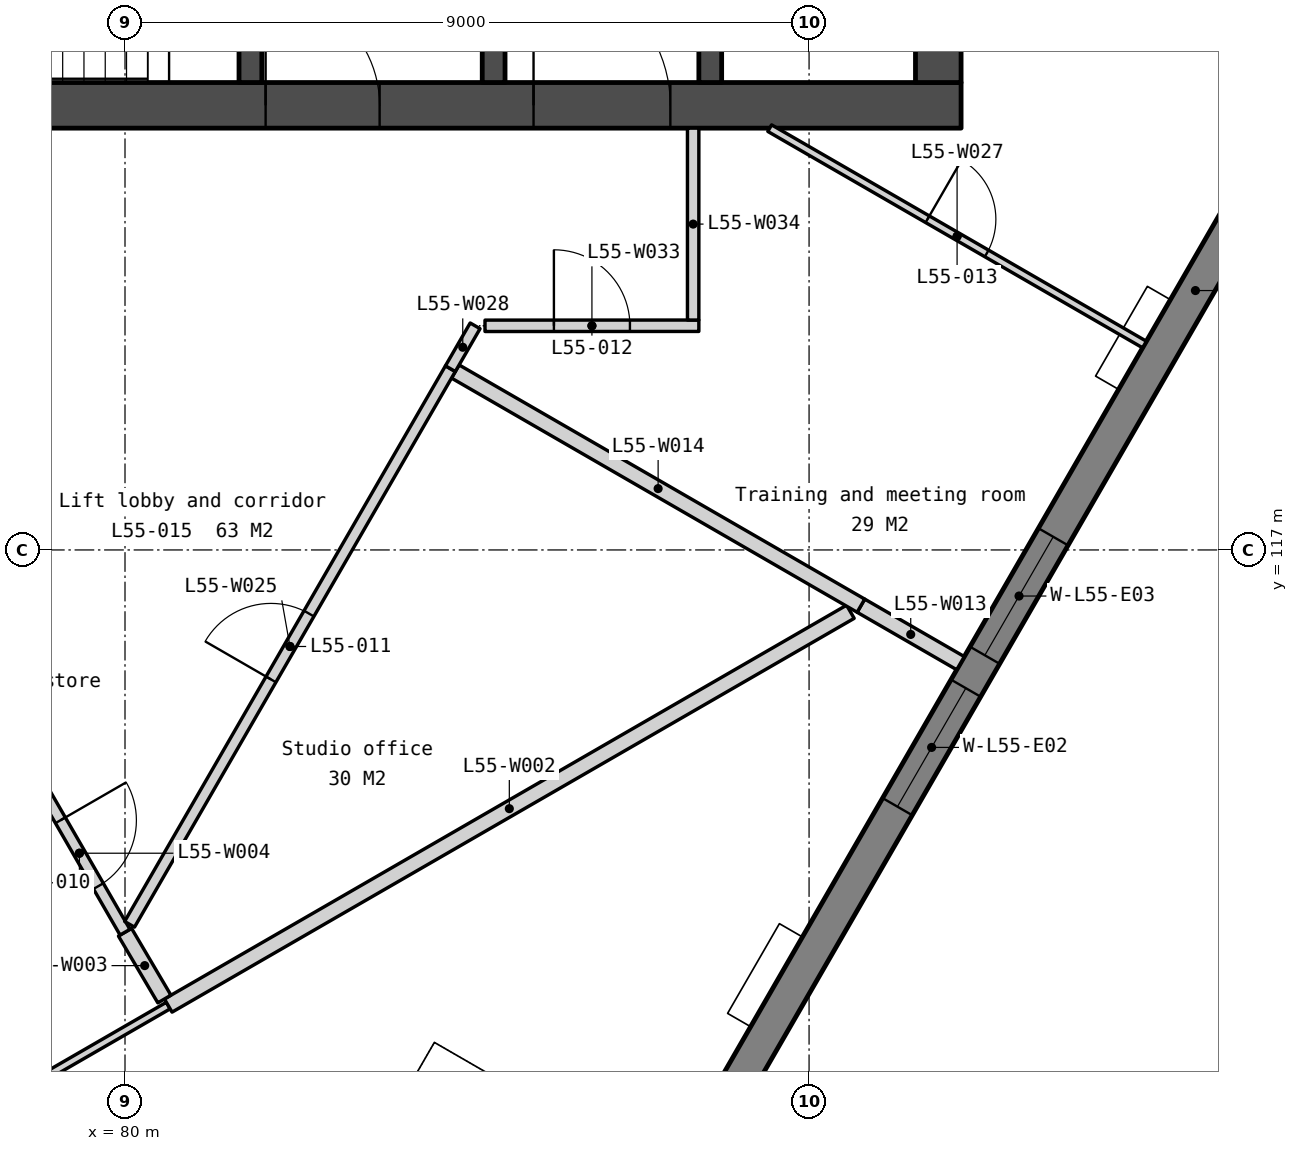
"""IFC4 building model, lengths in metres.
Left out: names, types, materials, properties, quantities, classifications, styles, units other than length and angle.
Written with IfcOpenShell. Run it as: python <this file> out.ifc"""

import sys

from ifc_helpers import new_model, si_unit, direction, frame, frame_2d, origin, place, context, subcontext, project, spatial, polyline, rectangle, outline, extrude, element, fill, save


model = new_model("IFC4")
c1 = context("Model", 3, precision=1e-05, world=origin(), true_north=direction((0.0, 1.0)))
c2 = subcontext(c1, "Body", "Model", "MODEL_VIEW")
j1 = project(units=[si_unit("LENGTHUNIT", "METRE"), si_unit("PLANEANGLEUNIT", "RADIAN")], contexts=[c1])
p1 = place(None, origin())
s1 = spatial("IfcSite", under=j1, at=p1, CompositionType="ELEMENT")
p2 = place(p1, origin())
s2 = spatial("IfcBuilding", under=s1, at=p2, CompositionType="ELEMENT")
p3 = place(p2, frame((0.0, 0.0, 219.2)))
s3 = spatial("IfcBuildingStorey", under=s2, at=p3, CompositionType="ELEMENT", Elevation=219.2)
p4 = place(p3, frame((69.0, 122.85, 0.0), z_axis=(0.0, 0.0, 1.0), x_axis=(1.0, 0.0, 0.0)))
e1 = element("IfcWall", 1, at=p4, inside=s3, PredefinedType="SOLIDWALL", context=c2, shape_type="SweptSolid", body=[
    extrude(rectangle(XDim=22.0, YDim=0.6, at=frame_2d((11.0, 0.0))), origin(), (0.0, 0.0, 1.0), 3.75),
])
p5 = place(p4, frame((16.375, 0.0, 0.0)))
e2 = element("IfcOpeningElement", 2, at=p5, cuts=e1, PredefinedType="OPENING", context=c2, shape_type="SweptSolid", body=[
    extrude(rectangle(XDim=1.8, YDim=2.1, at=frame_2d((0.9, 1.05))), frame((0.0, 0.31, 0.0), z_axis=(0.0, -1.0, 0.0), x_axis=(1.0, 0.0, 0.0)), (0.0, 0.0, 1.0), 0.62),
])
p6 = place(p4, frame((3.825, 0.0, 0.0)))
e3 = element("IfcOpeningElement", 3, at=p6, cuts=e1, PredefinedType="OPENING", context=c2, shape_type="SweptSolid", body=[
    extrude(rectangle(XDim=1.8, YDim=2.1, at=frame_2d((0.9, 1.05))), frame((0.0, 0.31, 0.0), z_axis=(0.0, -1.0, 0.0), x_axis=(1.0, 0.0, 0.0)), (0.0, 0.0, 1.0), 0.62),
])
p7 = place(p4, frame((12.85, 0.0, 0.0)))
e4 = element("IfcOpeningElement", 4, at=p7, cuts=e1, PredefinedType="OPENING", context=c2, shape_type="SweptSolid", body=[
    extrude(rectangle(XDim=1.5, YDim=2.1, at=frame_2d((0.75, 1.05))), frame((0.0, 0.31, 0.0), z_axis=(0.0, -1.0, 0.0), x_axis=(1.0, 0.0, 0.0)), (0.0, 0.0, 1.0), 0.62),
])
p8 = place(p3, frame((81.65, 125.7, 0.0), z_axis=(0.0, 0.0, 1.0), x_axis=(0.0, -1.0, 0.0)))
e5 = element("IfcWall", 5, at=p8, inside=s3, PredefinedType="SOLIDWALL", context=c2, shape_type="SweptSolid", body=[
    extrude(rectangle(XDim=2.55, YDim=0.3, at=frame_2d((1.275, 0.0))), origin(), (0.0, 0.0, 1.0), 3.75),
])
p9 = place(p8, frame((0.75, 0.0, 0.0)))
e6 = element("IfcOpeningElement", 6, at=p9, cuts=e5, PredefinedType="OPENING", context=c2, shape_type="SweptSolid", body=[
    extrude(rectangle(XDim=1.0, YDim=2.1, at=frame_2d((0.5, 1.05))), frame((0.0, 0.16, 0.0), z_axis=(0.0, -1.0, 0.0), x_axis=(1.0, 0.0, 0.0)), (0.0, 0.0, 1.0), 0.32),
])
p10 = place(p3, frame((84.85, 125.85, 0.0), z_axis=(0.0, 0.0, 1.0), x_axis=(0.0, -1.0, 0.0)))
e7 = element("IfcWall", 7, at=p10, inside=s3, PredefinedType="SOLIDWALL", context=c2, shape_type="SweptSolid", body=[
    extrude(rectangle(XDim=2.7, YDim=0.3, at=frame_2d((1.35, 0.0))), origin(), (0.0, 0.0, 1.0), 3.75),
])
p11 = place(p3, frame((87.7, 133.95, 0.0), z_axis=(0.0, 0.0, 1.0), x_axis=(0.0, -1.0, 0.0)))
e8 = element("IfcWall", 8, at=p11, inside=s3, PredefinedType="SOLIDWALL", context=c2, shape_type="SweptSolid", body=[
    extrude(rectangle(XDim=10.8, YDim=0.3, at=frame_2d((5.4, 0.0))), origin(), (0.0, 0.0, 1.0), 3.75),
])
p12 = place(p11, frame((6.95, 0.0, 0.0)))
e9 = element("IfcOpeningElement", 9, at=p12, cuts=e8, PredefinedType="OPENING", context=c2, shape_type="SweptSolid", body=[
    extrude(rectangle(XDim=1.1, YDim=2.1, at=frame_2d((0.55, 1.05))), frame((0.0, 0.16, 0.0), z_axis=(0.0, -1.0, 0.0), x_axis=(1.0, 0.0, 0.0)), (0.0, 0.0, 1.0), 0.32),
])
p13 = place(p11, frame((5.1, 0.0, 0.0)))
e10 = element("IfcOpeningElement", 10, at=p13, cuts=e8, PredefinedType="OPENING", context=c2, shape_type="SweptSolid", body=[
    extrude(rectangle(XDim=1.0, YDim=2.1, at=frame_2d((0.5, 1.05))), frame((0.0, 0.16, 0.0), z_axis=(0.0, -1.0, 0.0), x_axis=(1.0, 0.0, 0.0)), (0.0, 0.0, 1.0), 0.32),
])
p14 = place(p11, frame((9.25, 0.0, 0.0)))
e11 = element("IfcOpeningElement", 11, at=p14, cuts=e8, PredefinedType="OPENING", context=c2, shape_type="SweptSolid", body=[
    extrude(rectangle(XDim=1.1, YDim=2.1, at=frame_2d((0.55, 1.05))), frame((0.0, 0.16, 0.0), z_axis=(0.0, -1.0, 0.0), x_axis=(1.0, 0.0, 0.0)), (0.0, 0.0, 1.0), 0.32),
])
p15 = place(p3, frame((90.7, 133.95, 0.0), z_axis=(0.0, 0.0, 1.0), x_axis=(0.0, -1.0, 0.0)))
e12 = element("IfcWall", 12, at=p15, inside=s3, PredefinedType="SOLIDWALL", context=c2, shape_type="SweptSolid", body=[
    extrude(rectangle(XDim=10.8, YDim=0.6, at=frame_2d((5.4, 0.0))), origin(), (0.0, 0.0, 1.0), 3.75),
])
p16 = place(p3, frame((87.296, 108.658, -0.15), z_axis=(0.0, 0.0, 1.0), x_axis=(0.500003227337, 0.866023540472, 0.0)))
e13 = element("IfcWall", 13, at=p16, inside=s3, PredefinedType="SOLIDWALL", context=c2, shape_type="SweptSolid", body=[
    extrude(outline(polyline([(27.147, 3.9), (27.147, 0.0), (0.0, 0.0), (0.0, 3.9), (27.147, 3.9)])), frame((0.0, 0.225, 0.0), z_axis=(0.0, -1.0, 0.0), x_axis=(1.0, 0.0, 0.0)), (0.0, 0.0, 1.0), 0.45),
])
p17 = place(p16, frame((5.732, 0.0, 0.95)))
e14 = element("IfcOpeningElement", 14, at=p17, cuts=e13, PredefinedType="OPENING", context=c2, shape_type="SweptSolid", body=[
    extrude(rectangle(XDim=1.8, YDim=2.2, at=frame_2d((0.9, 1.1))), frame((0.0, 0.235, 0.0), z_axis=(0.0, -1.0, 0.0), x_axis=(1.0, 0.0, 0.0)), (0.0, 0.0, 1.0), 0.47),
])
p18 = place(p16, frame((8.032, 0.0, 0.95)))
e15 = element("IfcOpeningElement", 15, at=p18, cuts=e13, PredefinedType="OPENING", context=c2, shape_type="SweptSolid", body=[
    extrude(rectangle(XDim=1.8, YDim=2.2, at=frame_2d((0.9, 1.1))), frame((0.0, 0.235, 0.0), z_axis=(0.0, -1.0, 0.0), x_axis=(1.0, 0.0, 0.0)), (0.0, 0.0, 1.0), 0.47),
])
p19 = place(p16, frame((15.415, 0.0, 0.95)))
e16 = element("IfcOpeningElement", 16, at=p19, cuts=e13, PredefinedType="OPENING", context=c2, shape_type="SweptSolid", body=[
    extrude(rectangle(XDim=1.8, YDim=2.2, at=frame_2d((0.9, 1.1))), frame((0.0, 0.235, 0.0), z_axis=(0.0, -1.0, 0.0), x_axis=(1.0, 0.0, 0.0)), (0.0, 0.0, 1.0), 0.47),
])
p20 = place(p16, frame((17.715, 0.0, 0.95)))
e17 = element("IfcOpeningElement", 17, at=p20, cuts=e13, PredefinedType="OPENING", context=c2, shape_type="SweptSolid", body=[
    extrude(rectangle(XDim=1.8, YDim=2.2, at=frame_2d((0.9, 1.1))), frame((0.0, 0.235, 0.0), z_axis=(0.0, -1.0, 0.0), x_axis=(1.0, 0.0, 0.0)), (0.0, 0.0, 1.0), 0.47),
])
p21 = place(p16, frame((25.14, 0.0, 0.95)))
e18 = element("IfcOpeningElement", 18, at=p21, cuts=e13, PredefinedType="OPENING", context=c2, shape_type="SweptSolid", body=[
    extrude(rectangle(XDim=1.2, YDim=2.2, at=frame_2d((0.6, 1.1))), frame((0.0, 0.235, 0.0), z_axis=(0.0, -1.0, 0.0), x_axis=(1.0, 0.0, 0.0)), (0.0, 0.0, 1.0), 0.47),
])
p22 = place(p2, frame((0.0, 0.0, 215.3)))
s4 = spatial("IfcBuildingStorey", under=s2, at=p22, CompositionType="ELEMENT", Elevation=215.3)
p23 = place(p22, frame((87.379, 108.351, 0.0), z_axis=(0.0, 0.0, 1.0), x_axis=(-0.866047669374, 0.499961432884, 0.0)))
e19 = element("IfcWall", 19, at=p23, inside=s4, PredefinedType="SOLIDWALL", context=c2, shape_type="SweptSolid", body=[
    extrude(rectangle(XDim=3.95, YDim=0.45, at=frame_2d((1.975, 0.0))), origin(), (0.0, 0.0, 1.0), 7.65),
])
p24 = place(p3, frame((73.849, 107.125, 0.0), z_axis=(0.0, 0.0, 1.0), x_axis=(0.866027358884, 0.499996613652, 0.0)))
e20 = element("IfcWall", 20, at=p24, inside=s3, PredefinedType="PARTITIONING", context=c2, shape_type="SweptSolid", body=[
    extrude(rectangle(XDim=7.76, YDim=0.1, at=frame_2d((3.88, 0.0))), origin(), (0.0, 0.0, 1.0), 3.75),
])
p25 = place(p24, frame((3.43, 0.0, 0.0)))
e21 = element("IfcOpeningElement", 21, at=p25, cuts=e20, PredefinedType="OPENING", context=c2, shape_type="SweptSolid", body=[
    extrude(rectangle(XDim=0.9, YDim=2.1, at=frame_2d((0.45, 1.05))), frame((0.0, 0.06, 0.0), z_axis=(0.0, -1.0, 0.0), x_axis=(1.0, 0.0, 0.0)), (0.0, 0.0, 1.0), 0.12),
])
p26 = place(p3, frame((80.569, 111.005, 0.0), z_axis=(0.0, 0.0, 1.0), x_axis=(0.866025130863, 0.500000472714, 0.0)))
e22 = element("IfcWall", 22, at=p26, inside=s3, PredefinedType="PARTITIONING", context=c2, shape_type="SweptSolid", body=[
    extrude(rectangle(XDim=10.363, YDim=0.2, at=frame_2d((5.182, 0.0))), origin(), (0.0, 0.0, 1.0), 3.75),
])
p27 = place(p3, frame((80.0, 111.97, 0.0), z_axis=(0.0, 0.0, 1.0), x_axis=(0.507689136561, -0.861540330233, 0.0)))
e23 = element("IfcWall", 23, at=p27, inside=s3, PredefinedType="PARTITIONING", context=c2, shape_type="SweptSolid", body=[
    extrude(rectangle(XDim=1.021, YDim=0.2, at=frame_2d((0.51, 0.0))), origin(), (0.0, 0.0, 1.0), 3.75),
])
p28 = place(p3, frame((78.8, 114.049, 0.0), z_axis=(0.0, 0.0, 1.0), x_axis=(0.500001309137, -0.866024647952, 0.0)))
e24 = element("IfcWall", 24, at=p28, inside=s3, PredefinedType="PARTITIONING", context=c2, shape_type="SweptSolid", body=[
    extrude(rectangle(XDim=2.4, YDim=0.15, at=frame_2d((1.2, 0.0))), origin(), (0.0, 0.0, 1.0), 3.75),
])
p29 = place(p28, frame((0.7, 0.0, 0.0)))
e25 = element("IfcOpeningElement", 25, at=p29, cuts=e24, PredefinedType="OPENING", context=c2, shape_type="SweptSolid", body=[
    extrude(rectangle(XDim=1.0, YDim=2.1, at=frame_2d((0.5, 1.05))), frame((0.0, 0.085, 0.0), z_axis=(0.0, -1.0, 0.0), x_axis=(1.0, 0.0, 0.0)), (0.0, 0.0, 1.0), 0.17),
])
p30 = place(p3, frame((89.682, 116.267, 0.0), z_axis=(0.0, 0.0, 1.0), x_axis=(0.866000172474, -0.500043699366, 0.0)))
e26 = element("IfcWall", 26, at=p30, inside=s3, PredefinedType="PARTITIONING", context=c2, shape_type="SweptSolid", body=[
    extrude(rectangle(XDim=1.513, YDim=0.2, at=frame_2d((0.756, 0.0))), origin(), (0.0, 0.0, 1.0), 3.75),
])
p31 = place(p3, frame((84.346, 119.348, 0.0), z_axis=(0.0, 0.0, 1.0), x_axis=(0.866037793621, -0.49997853956, 0.0)))
e27 = element("IfcWall", 27, at=p31, inside=s3, PredefinedType="PARTITIONING", context=c2, shape_type="SweptSolid", body=[
    extrude(rectangle(XDim=6.162, YDim=0.2, at=frame_2d((3.081, 0.0))), origin(), (0.0, 0.0, 1.0), 3.75),
])
p32 = place(p3, frame((80.06, 112.074, 0.0), z_axis=(0.0, 0.0, 1.0), x_axis=(0.500005339912, 0.866022320763, 0.0)))
e28 = element("IfcWall", 28, at=p32, inside=s3, PredefinedType="PARTITIONING", context=c2, shape_type="SweptSolid", body=[
    extrude(rectangle(XDim=8.442, YDim=0.15, at=frame_2d((4.221, 0.0))), origin(), (0.0, 0.0, 1.0), 3.75),
])
p33 = place(p32, frame((3.721, 0.0, 0.0)))
e29 = element("IfcOpeningElement", 29, at=p33, cuts=e28, PredefinedType="OPENING", context=c2, shape_type="SweptSolid", body=[
    extrude(rectangle(XDim=1.0, YDim=2.1, at=frame_2d((0.5, 1.05))), frame((0.0, 0.085, 0.0), z_axis=(0.0, -1.0, 0.0), x_axis=(1.0, 0.0, 0.0)), (0.0, 0.0, 1.0), 0.17),
])
p34 = place(p3, frame((88.482, 122.55, 0.0), z_axis=(0.0, 0.0, 1.0), x_axis=(0.866023511746, -0.500003277092, 0.0)))
e30 = element("IfcWall", 30, at=p34, inside=s3, PredefinedType="PARTITIONING", context=c2, shape_type="SweptSolid", body=[
    extrude(rectangle(XDim=5.694, YDim=0.1, at=frame_2d((2.847, 0.0))), origin(), (0.0, 0.0, 1.0), 3.75),
])
p35 = place(p34, frame((2.397, 0.0, 0.0)))
e31 = element("IfcOpeningElement", 31, at=p35, cuts=e30, PredefinedType="OPENING", context=c2, shape_type="SweptSolid", body=[
    extrude(rectangle(XDim=0.9, YDim=2.1, at=frame_2d((0.45, 1.05))), frame((0.0, 0.06, 0.0), z_axis=(0.0, -1.0, 0.0), x_axis=(1.0, 0.0, 0.0)), (0.0, 0.0, 1.0), 0.12),
])
p36 = place(p3, frame((84.281, 119.385, 0.0), z_axis=(0.0, 0.0, 1.0), x_axis=(0.499971370958, 0.866041932139, 0.0)))
e32 = element("IfcWall", 32, at=p36, inside=s3, PredefinedType="PARTITIONING", context=c2, shape_type="SweptSolid", body=[
    extrude(rectangle(XDim=0.651, YDim=0.15, at=frame_2d((0.325, 0.0))), origin(), (0.0, 0.0, 1.0), 3.75),
])
p37 = place(p3, frame((84.736, 119.949, 0.0), z_axis=(0.0, 0.0, 1.0), x_axis=(0.999999939771, 0.000347071563, 0.0)))
e33 = element("IfcWall", 33, at=p37, inside=s3, PredefinedType="PARTITIONING", context=c2, shape_type="SweptSolid", body=[
    extrude(rectangle(XDim=2.814, YDim=0.15, at=frame_2d((1.407, 0.0))), origin(), (0.0, 0.0, 1.0), 3.75),
])
p38 = place(p37, frame((0.907, 0.0, 0.0)))
e34 = element("IfcOpeningElement", 34, at=p38, cuts=e33, PredefinedType="OPENING", context=c2, shape_type="SweptSolid", body=[
    extrude(rectangle(XDim=1.0, YDim=2.1, at=frame_2d((0.5, 1.05))), frame((0.0, 0.085, 0.0), z_axis=(0.0, -1.0, 0.0), x_axis=(1.0, 0.0, 0.0)), (0.0, 0.0, 1.0), 0.17),
])
p39 = place(p3, frame((87.475, 120.025, 0.0), z_axis=(0.0, 0.0, 1.0), x_axis=(9.6683747e-05, 0.999999995326, 0.0)))
e35 = element("IfcWall", 35, at=p39, inside=s3, PredefinedType="PARTITIONING", context=c2, shape_type="SweptSolid", body=[
    extrude(rectangle(XDim=2.525, YDim=0.15, at=frame_2d((1.263, 0.0))), origin(), (0.0, 0.0, 1.0), 3.75),
])
p40 = place(p5, origin())
e36 = element("IfcDoor", 36, at=p40, inside=s3, OperationType="DOUBLE_DOOR_DOUBLE_SWING", PredefinedType="DOOR", context=c2, shape_type="SweptSolid", body=[
    extrude(rectangle(XDim=1.8, YDim=2.1, at=frame_2d((0.9, 1.05))), frame((0.0, 0.025, 0.0), z_axis=(0.0, -1.0, 0.0), x_axis=(1.0, 0.0, 0.0)), (0.0, 0.0, 1.0), 0.05),
])
fill(e2, e36)
p41 = place(p7, origin())
e37 = element("IfcDoor", 37, at=p41, inside=s3, OperationType="DOUBLE_DOOR_DOUBLE_SWING", PredefinedType="DOOR", context=c2, shape_type="SweptSolid", body=[
    extrude(rectangle(XDim=1.5, YDim=2.1, at=frame_2d((0.75, 1.05))), frame((0.0, 0.025, 0.0), z_axis=(0.0, -1.0, 0.0), x_axis=(1.0, 0.0, 0.0)), (0.0, 0.0, 1.0), 0.05),
])
fill(e4, e37)
p42 = place(p17, origin())
e38 = element("IfcWindow", 38, at=p42, inside=s3, PartitioningType="SINGLE_PANEL", PredefinedType="WINDOW", context=c2, shape_type="SweptSolid", body=[
    extrude(rectangle(XDim=1.8, YDim=2.2, at=frame_2d((0.9, 1.1))), frame((0.0, 0.03, 0.0), z_axis=(0.0, -1.0, 0.0), x_axis=(1.0, 0.0, 0.0)), (0.0, 0.0, 1.0), 0.06),
])
fill(e14, e38)
p43 = place(p18, origin())
e39 = element("IfcWindow", 39, at=p43, inside=s3, PartitioningType="SINGLE_PANEL", PredefinedType="WINDOW", context=c2, shape_type="SweptSolid", body=[
    extrude(rectangle(XDim=1.8, YDim=2.2, at=frame_2d((0.9, 1.1))), frame((0.0, 0.03, 0.0), z_axis=(0.0, -1.0, 0.0), x_axis=(1.0, 0.0, 0.0)), (0.0, 0.0, 1.0), 0.06),
])
fill(e15, e39)
p44 = place(p29, origin())
e40 = element("IfcDoor", 40, at=p44, inside=s3, OperationType="SINGLE_SWING_LEFT", PredefinedType="DOOR", context=c2, shape_type="SweptSolid", body=[
    extrude(rectangle(XDim=1.0, YDim=2.1, at=frame_2d((0.5, 1.05))), frame((0.0, 0.025, 0.0), z_axis=(0.0, -1.0, 0.0), x_axis=(1.0, 0.0, 0.0)), (0.0, 0.0, 1.0), 0.05),
])
fill(e25, e40)
p45 = place(p33, origin())
e41 = element("IfcDoor", 41, at=p45, inside=s3, OperationType="SINGLE_SWING_LEFT", PredefinedType="DOOR", context=c2, shape_type="SweptSolid", body=[
    extrude(rectangle(XDim=1.0, YDim=2.1, at=frame_2d((0.5, 1.05))), frame((0.0, 0.025, 0.0), z_axis=(0.0, -1.0, 0.0), x_axis=(1.0, 0.0, 0.0)), (0.0, 0.0, 1.0), 0.05),
])
fill(e29, e41)
p46 = place(p38, origin())
e42 = element("IfcDoor", 42, at=p46, inside=s3, OperationType="SINGLE_SWING_LEFT", PredefinedType="DOOR", context=c2, shape_type="SweptSolid", body=[
    extrude(rectangle(XDim=1.0, YDim=2.1, at=frame_2d((0.5, 1.05))), frame((0.0, 0.025, 0.0), z_axis=(0.0, -1.0, 0.0), x_axis=(1.0, 0.0, 0.0)), (0.0, 0.0, 1.0), 0.05),
])
fill(e34, e42)
p47 = place(p35, origin())
e43 = element("IfcDoor", 43, at=p47, inside=s3, OperationType="SINGLE_SWING_LEFT", PredefinedType="DOOR", context=c2, shape_type="SweptSolid", body=[
    extrude(rectangle(XDim=0.9, YDim=2.1, at=frame_2d((0.45, 1.05))), frame((0.0, 0.025, 0.0), z_axis=(0.0, -1.0, 0.0), x_axis=(1.0, 0.0, 0.0)), (0.0, 0.0, 1.0), 0.05),
])
fill(e31, e43)
save(model, sys.argv[1])
